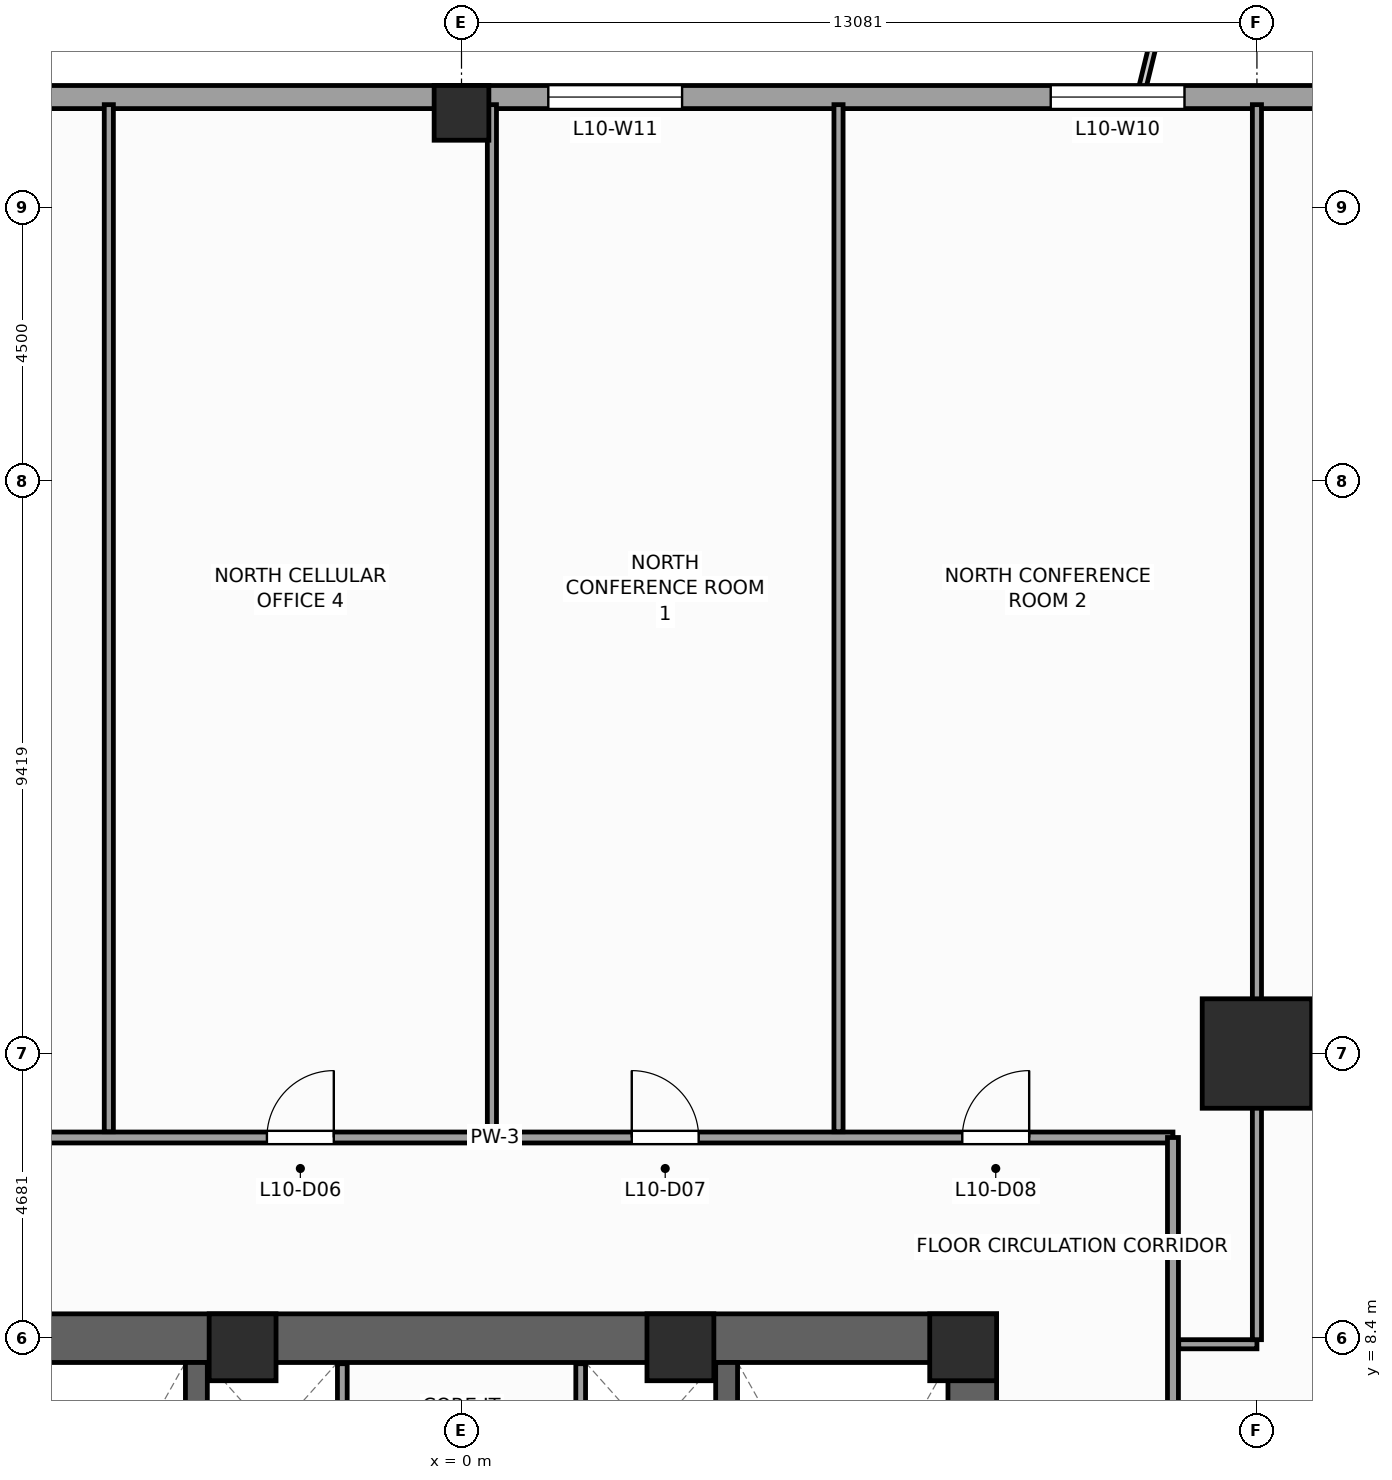
"""IFC4 building model, lengths in metres.
Left out: names, types, materials, properties, quantities, classifications, styles, units other than length and angle.
Written with IfcOpenShell. Run it as: python <this file> out.ifc"""

import sys

from ifc_helpers import new_model, si_unit, direction, frame, frame_2d, origin, origin_2d, place, context, subcontext, project, spatial, rectangle, extrude, source, transform, mapped, element, fill, save


model = new_model("IFC4")
c1 = context("Model", 3, precision=1e-05, world=origin(), true_north=direction((0.0, 1.0)))
c2 = subcontext(c1, "Body", "Model", "MODEL_VIEW")
j1 = project(units=[si_unit("LENGTHUNIT", "METRE"), si_unit("PLANEANGLEUNIT", "RADIAN")], contexts=[c1])
p1 = place(None, origin())
s1 = spatial("IfcSite", under=j1, at=p1, CompositionType="ELEMENT")
p2 = place(p1, origin())
s2 = spatial("IfcBuilding", under=s1, at=p2, CompositionType="ELEMENT")
p3 = place(p2, frame((0.0, 0.0, 46.0)))
s3 = spatial("IfcBuildingStorey", under=s2, at=p3, CompositionType="ELEMENT", Elevation=46.0)
p4 = place(p3, frame((-8.8, 8.4, 0.0), z_axis=(0.0, 0.0, 1.0), x_axis=(1.0, 0.0, 0.0)))
e1 = element("IfcWall", 1, at=p4, inside=s3, PredefinedType="SHEAR", context=c2, shape_type="SweptSolid", body=[
    extrude(rectangle(XDim=17.6, YDim=0.8, at=frame_2d((8.8, 0.0))), origin(), (0.0, 0.0, 1.0), 4.0),
])
p5 = place(p3, frame((8.4, -8.0, 0.0), z_axis=(0.0, 0.0, 1.0), x_axis=(0.0, 1.0, 0.0)))
e2 = element("IfcWall", 2, at=p5, inside=s3, PredefinedType="SHEAR", context=c2, shape_type="SweptSolid", body=[
    extrude(rectangle(XDim=16.0, YDim=0.8, at=frame_2d((8.0, 0.0))), origin(), (0.0, 0.0, 1.0), 4.0),
])
p6 = place(p5, frame((4.69, 0.0, 0.0)))
e3 = element("IfcOpeningElement", 3, at=p6, cuts=e2, PredefinedType="OPENING", context=c2, shape_type="SweptSolid", body=[
    extrude(rectangle(XDim=1.3, YDim=2.2, at=frame_2d((0.65, 1.1))), frame((0.0, 0.41, 0.0), z_axis=(0.0, -1.0, 0.0), x_axis=(1.0, 0.0, 0.0)), (0.0, 0.0, 1.0), 0.82),
])
for number, where, z_axis, x_axis in (
    (4, (-4.36, -8.0, 0.0), (0.0, 0.0, 1.0), (0.0, 1.0, 0.0)),
    (5, (4.36, -8.0, 0.0), (0.0, 0.0, 1.0), (0.0, 1.0, 0.0)),
):
    element("IfcWall", number, at=place(p3, frame(where, z_axis=z_axis, x_axis=x_axis)), inside=s3, PredefinedType="SHEAR", context=c2, shape_type="SweptSolid", body=[
        extrude(rectangle(XDim=16.0, YDim=0.36, at=frame_2d((8.0, 0.0))), origin(), (0.0, 0.0, 1.0), 4.0),
    ])
m1 = source(origin(), c2, "Body", "SweptSolid", [
    extrude(rectangle(XDim=1.1, YDim=1.1, at=origin_2d()), origin(), (0.0, 0.0, 1.0), 4.0),
])
for number, where, z_axis, x_axis in (
    (6, (8.25, 8.25, 0.0), (0.0, 0.0, 1.0), (1.0, 0.0, 0.0)),
    (7, (-3.6, 8.25, 0.0), (0.0, 0.0, 1.0), (1.0, 0.0, 0.0)),
    (8, (3.6, 8.25, 0.0), (0.0, 0.0, 1.0), (1.0, 0.0, 0.0)),
):
    element("IfcColumn", number, at=place(p3, frame(where, z_axis=z_axis, x_axis=x_axis)), inside=s3, PredefinedType="PILASTER", context=c2, shape_type="MappedRepresentation", body=[
        mapped(m1, transform((0.0, 0.0, 0.0), scale=1.0)),
    ])
m2 = source(origin(), c2, "Body", "SweptSolid", [
    extrude(rectangle(XDim=1.8, YDim=1.8, at=origin_2d()), origin(), (0.0, 0.0, 1.0), 4.0),
])
p7 = place(p3, frame((13.081, 13.081, 0.0), z_axis=(0.0, 0.0, 1.0), x_axis=(1.0, 0.0, 0.0)))
e9 = element("IfcColumn", 9, at=p7, inside=s3, PredefinedType="COLUMN", context=c2, shape_type="MappedRepresentation", body=[
    mapped(m2, transform((0.0, 0.0, 0.0), scale=1.0)),
])
m3 = source(origin(), c2, "Body", "SweptSolid", [
    extrude(rectangle(XDim=0.9, YDim=0.9, at=origin_2d()), origin(), (0.0, 0.0, 1.0), 4.0),
])
p8 = place(p3, frame((0.0, 28.55, 0.0), z_axis=(0.0, 0.0, 1.0), x_axis=(1.0, 0.0, 0.0)))
e10 = element("IfcColumn", 10, at=p8, inside=s3, PredefinedType="COLUMN", context=c2, shape_type="MappedRepresentation", body=[
    mapped(m3, transform((0.0, 0.0, 0.0), scale=1.0)),
])
p9 = place(p3, frame((25.69, 28.81, 0.0), z_axis=(0.0, 0.0, 1.0), x_axis=(-1.0, 0.0, 0.0)))
e11 = element("IfcWall", 11, at=p9, inside=s3, PredefinedType="STANDARD", context=c2, shape_type="SweptSolid", body=[
    extrude(rectangle(XDim=51.38, YDim=0.38, at=frame_2d((25.69, 0.0))), origin(), (0.0, 0.0, 1.0), 3.12),
])
p10 = place(p9, frame((5.466, 0.0, 0.49)))
e12 = element("IfcOpeningElement", 12, at=p10, cuts=e11, PredefinedType="OPENING", context=c2, shape_type="SweptSolid", body=[
    extrude(rectangle(XDim=1.4, YDim=2.4, at=frame_2d((0.7, 1.2))), frame((0.0, 0.2, 0.0), z_axis=(0.0, -1.0, 0.0), x_axis=(1.0, 0.0, 0.0)), (0.0, 0.0, 1.0), 0.4),
])
p11 = place(p9, frame((13.8, 0.0, 0.49)))
e13 = element("IfcOpeningElement", 13, at=p11, cuts=e11, PredefinedType="OPENING", context=c2, shape_type="SweptSolid", body=[
    extrude(rectangle(XDim=2.2, YDim=2.4, at=frame_2d((1.1, 1.2))), frame((0.0, 0.2, 0.0), z_axis=(0.0, -1.0, 0.0), x_axis=(1.0, 0.0, 0.0)), (0.0, 0.0, 1.0), 0.4),
])
p12 = place(p9, frame((22.062, 0.0, 0.49)))
e14 = element("IfcOpeningElement", 14, at=p12, cuts=e11, PredefinedType="OPENING", context=c2, shape_type="SweptSolid", body=[
    extrude(rectangle(XDim=2.2, YDim=2.4, at=frame_2d((1.1, 1.2))), frame((0.0, 0.2, 0.0), z_axis=(0.0, -1.0, 0.0), x_axis=(1.0, 0.0, 0.0)), (0.0, 0.0, 1.0), 0.4),
])
p13 = place(p9, frame((33.838, 0.0, 0.49)))
e15 = element("IfcOpeningElement", 15, at=p13, cuts=e11, PredefinedType="OPENING", context=c2, shape_type="SweptSolid", body=[
    extrude(rectangle(XDim=2.2, YDim=2.4, at=frame_2d((1.1, 1.2))), frame((0.0, 0.2, 0.0), z_axis=(0.0, -1.0, 0.0), x_axis=(1.0, 0.0, 0.0)), (0.0, 0.0, 1.0), 0.4),
])
p14 = place(p9, frame((43.487, 0.0, 0.49)))
e16 = element("IfcOpeningElement", 16, at=p14, cuts=e11, PredefinedType="OPENING", context=c2, shape_type="SweptSolid", body=[
    extrude(rectangle(XDim=1.4, YDim=2.4, at=frame_2d((0.7, 1.2))), frame((0.0, 0.2, 0.0), z_axis=(0.0, -1.0, 0.0), x_axis=(1.0, 0.0, 0.0)), (0.0, 0.0, 1.0), 0.4),
])
for number, where, z_axis, x_axis in (
    (17, (-1.96, 4.58, 0.0), (0.0, 0.0, 1.0), (0.0, 1.0, 0.0)),
    (18, (1.96, 4.58, 0.0), (0.0, 0.0, 1.0), (0.0, 1.0, 0.0)),
):
    element("IfcWall", number, at=place(p3, frame(where, z_axis=z_axis, x_axis=x_axis)), inside=s3, PredefinedType="PARTITIONING", context=c2, shape_type="SweptSolid", body=[
        extrude(rectangle(XDim=3.4, YDim=0.16, at=frame_2d((1.7, 0.0))), origin(), (0.0, 0.0, 1.0), 3.72),
    ])
p15 = place(p3, frame((-10.6, 11.7, 0.0), z_axis=(0.0, 0.0, 1.0), x_axis=(1.0, 0.0, 0.0)))
e19 = element("IfcWall", 19, at=p15, inside=s3, PredefinedType="PARTITIONING", context=c2, shape_type="SweptSolid", body=[
    extrude(rectangle(XDim=22.3, YDim=0.18, at=frame_2d((11.15, 0.0))), origin(), (0.0, 0.0, 1.0), 3.72),
])
p16 = place(p15, frame((2.014, 0.0, 0.0)))
e20 = element("IfcOpeningElement", 20, at=p16, cuts=e19, PredefinedType="OPENING", context=c2, shape_type="SweptSolid", body=[
    extrude(rectangle(XDim=1.1, YDim=2.2, at=frame_2d((0.55, 1.1))), frame((0.0, 0.1, 0.0), z_axis=(0.0, -1.0, 0.0), x_axis=(1.0, 0.0, 0.0)), (0.0, 0.0, 1.0), 0.2),
])
p17 = place(p15, frame((7.4, 0.0, 0.0)))
e21 = element("IfcOpeningElement", 21, at=p17, cuts=e19, PredefinedType="OPENING", context=c2, shape_type="SweptSolid", body=[
    extrude(rectangle(XDim=1.1, YDim=2.2, at=frame_2d((0.55, 1.1))), frame((0.0, 0.1, 0.0), z_axis=(0.0, -1.0, 0.0), x_axis=(1.0, 0.0, 0.0)), (0.0, 0.0, 1.0), 0.2),
])
p18 = place(p15, frame((13.4, 0.0, 0.0)))
e22 = element("IfcOpeningElement", 22, at=p18, cuts=e19, PredefinedType="OPENING", context=c2, shape_type="SweptSolid", body=[
    extrude(rectangle(XDim=1.1, YDim=2.2, at=frame_2d((0.55, 1.1))), frame((0.0, 0.1, 0.0), z_axis=(0.0, -1.0, 0.0), x_axis=(1.0, 0.0, 0.0)), (0.0, 0.0, 1.0), 0.2),
])
p19 = place(p15, frame((18.835, 0.0, 0.0)))
e23 = element("IfcOpeningElement", 23, at=p19, cuts=e19, PredefinedType="OPENING", context=c2, shape_type="SweptSolid", body=[
    extrude(rectangle(XDim=1.1, YDim=2.2, at=frame_2d((0.55, 1.1))), frame((0.0, 0.1, 0.0), z_axis=(0.0, -1.0, 0.0), x_axis=(1.0, 0.0, 0.0)), (0.0, 0.0, 1.0), 0.2),
])
p20 = place(p3, frame((11.7, -0.95, 0.0), z_axis=(0.0, 0.0, 1.0), x_axis=(0.0, 1.0, 0.0)))
e24 = element("IfcWall", 24, at=p20, inside=s3, PredefinedType="PARTITIONING", context=c2, shape_type="SweptSolid", body=[
    extrude(rectangle(XDim=12.65, YDim=0.18, at=frame_2d((6.325, 0.0))), origin(), (0.0, 0.0, 1.0), 3.72),
])
p21 = place(p20, frame((6.387, 0.0, 0.0)))
e25 = element("IfcOpeningElement", 25, at=p21, cuts=e24, PredefinedType="OPENING", context=c2, shape_type="SweptSolid", body=[
    extrude(rectangle(XDim=1.1, YDim=2.2, at=frame_2d((0.55, 1.1))), frame((0.0, 0.1, 0.0), z_axis=(0.0, -1.0, 0.0), x_axis=(1.0, 0.0, 0.0)), (0.0, 0.0, 1.0), 0.2),
])
for number, where, z_axis, x_axis in (
    (26, (-5.8, 11.795, 0.0), (0.0, 0.0, 1.0), (0.0, 1.0, 0.0)),
    (27, (0.5, 11.795, 0.0), (0.0, 0.0, 1.0), (0.0, 1.0, 0.0)),
    (28, (6.2, 11.795, 0.0), (0.0, 0.0, 1.0), (0.0, 1.0, 0.0)),
):
    element("IfcWall", number, at=place(p3, frame(where, z_axis=z_axis, x_axis=x_axis)), inside=s3, PredefinedType="PARTITIONING", context=c2, shape_type="SweptSolid", body=[
        extrude(rectangle(XDim=16.89, YDim=0.15, at=frame_2d((8.445, 0.0))), origin(), (0.0, 0.0, 1.0), 3.72),
    ])
p22 = place(p3, frame((11.795, 8.3, 0.0), z_axis=(0.0, 0.0, 1.0), x_axis=(1.0, 0.0, 0.0)))
e29 = element("IfcWall", 29, at=p22, inside=s3, PredefinedType="PARTITIONING", context=c2, shape_type="SweptSolid", body=[
    extrude(rectangle(XDim=1.286, YDim=0.15, at=frame_2d((0.643, 0.0))), origin(), (0.0, 0.0, 1.0), 3.72),
])
p23 = place(p3, frame((13.081, 8.375, 0.0), z_axis=(0.0, 0.0, 1.0), x_axis=(0.0, 1.0, 0.0)))
e30 = element("IfcWall", 30, at=p23, inside=s3, PredefinedType="PARTITIONING", context=c2, shape_type="SweptSolid", body=[
    extrude(rectangle(XDim=20.31, YDim=0.15, at=frame_2d((10.155, 0.0))), origin(), (0.0, 0.0, 1.0), 2.712),
])
m4 = source(origin(), c2, "Body", "SweptSolid", [
    extrude(rectangle(XDim=2.2, YDim=2.4, at=frame_2d((1.1, 1.2))), frame((0.0, 0.03, 0.0), z_axis=(0.0, -1.0, 0.0), x_axis=(1.0, 0.0, 0.0)), (0.0, 0.0, 1.0), 0.06),
])
p24 = place(p11, origin())
e31 = element("IfcWindow", 31, at=p24, inside=s3, PartitioningType="SINGLE_PANEL", PredefinedType="WINDOW", context=c2, shape_type="MappedRepresentation", body=[
    mapped(m4, transform((0.0, 0.0, 0.0), scale=1.0)),
])
fill(e13, e31)
p25 = place(p12, origin())
e32 = element("IfcWindow", 32, at=p25, inside=s3, PartitioningType="SINGLE_PANEL", PredefinedType="WINDOW", context=c2, shape_type="MappedRepresentation", body=[
    mapped(m4, transform((0.0, 0.0, 0.0), scale=1.0)),
])
fill(e14, e32)
m5 = source(origin(), c2, "Body", "SweptSolid", [
    extrude(rectangle(XDim=1.1, YDim=2.2, at=frame_2d((0.55, 1.1))), frame((0.0, 0.025, 0.0), z_axis=(0.0, -1.0, 0.0), x_axis=(1.0, 0.0, 0.0)), (0.0, 0.0, 1.0), 0.05),
])
p26 = place(p17, origin())
e33 = element("IfcDoor", 33, at=p26, inside=s3, OperationType="SINGLE_SWING_RIGHT", PredefinedType="DOOR", context=c2, shape_type="MappedRepresentation", body=[
    mapped(m5, transform((0.0, 0.0, 0.0), scale=1.0)),
])
fill(e21, e33)
p27 = place(p18, origin())
e34 = element("IfcDoor", 34, at=p27, inside=s3, OperationType="SINGLE_SWING_LEFT", PredefinedType="DOOR", context=c2, shape_type="MappedRepresentation", body=[
    mapped(m5, transform((0.0, 0.0, 0.0), scale=1.0)),
])
fill(e22, e34)
p28 = place(p19, origin())
e35 = element("IfcDoor", 35, at=p28, inside=s3, OperationType="SINGLE_SWING_RIGHT", PredefinedType="DOOR", context=c2, shape_type="MappedRepresentation", body=[
    mapped(m5, transform((0.0, 0.0, 0.0), scale=1.0)),
])
fill(e23, e35)
save(model, sys.argv[1])
